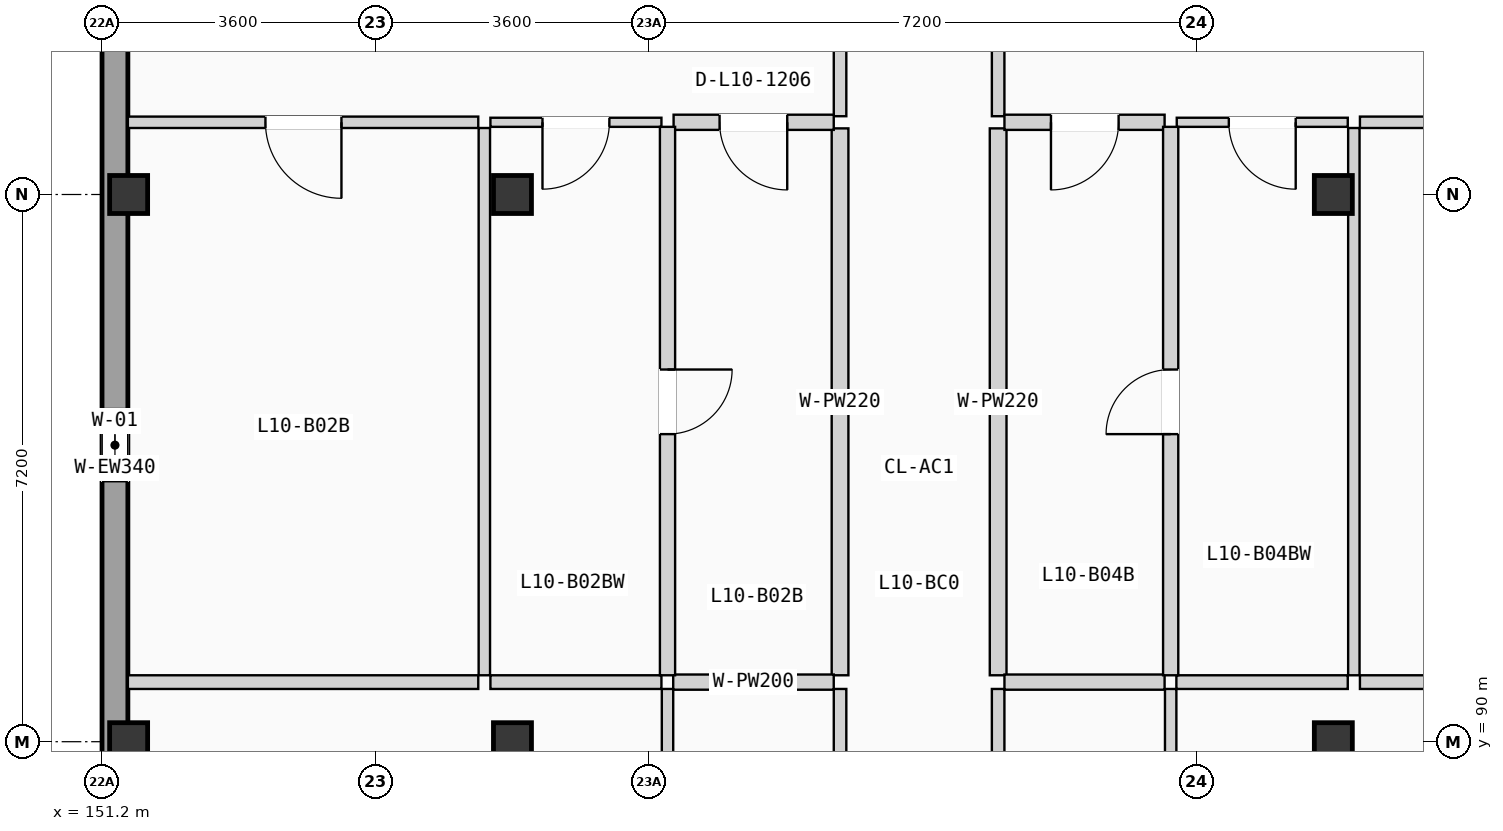
"""IFC4 building model, lengths in metres.
Left out: names, types, materials, properties, quantities, classifications, styles, units other than length and angle.
Written with IfcOpenShell. Run it as: python <this file> out.ifc"""

import sys

from ifc_helpers import new_model, si_unit, direction, frame, frame_2d, origin, origin_2d, place, context, subcontext, project, spatial, rectangle, extrude, element, fill, save


model = new_model("IFC4")
c1 = context("Model", 3, precision=1e-05, world=origin(), true_north=direction((0.0, 1.0)))
c2 = subcontext(c1, "Body", "Model", "MODEL_VIEW")
j1 = project(units=[si_unit("LENGTHUNIT", "METRE"), si_unit("PLANEANGLEUNIT", "RADIAN")], contexts=[c1])
p1 = place(None, origin())
s1 = spatial("IfcSite", under=j1, at=p1, CompositionType="ELEMENT")
p2 = place(p1, origin())
s2 = spatial("IfcBuilding", under=s1, at=p2, CompositionType="ELEMENT")
p3 = place(p2, frame((0.0, 0.0, 34.125)))
s3 = spatial("IfcBuildingStorey", under=s2, at=p3, CompositionType="ELEMENT", Elevation=34.125)
for number, where, z_axis, x_axis in (
    (1, (151.55, 90.0, 0.0), (0.0, 0.0, 1.0), (1.0, 0.0, 0.0)),
    (2, (151.55, 97.2, 0.0), (0.0, 0.0, 1.0), (1.0, 0.0, 0.0)),
    (3, (156.6, 90.0, 0.0), (0.0, 0.0, 1.0), (1.0, 0.0, 0.0)),
    (4, (156.6, 97.2, 0.0), (0.0, 0.0, 1.0), (1.0, 0.0, 0.0)),
    (5, (167.4, 90.0, 0.0), (0.0, 0.0, 1.0), (1.0, 0.0, 0.0)),
    (6, (167.4, 97.2, 0.0), (0.0, 0.0, 1.0), (1.0, 0.0, 0.0)),
):
    element("IfcColumn", number, at=place(p3, frame(where, z_axis=z_axis, x_axis=x_axis)), inside=s3, PredefinedType="COLUMN", context=c2, shape_type="SweptSolid", body=[
        extrude(rectangle(XDim=0.5, YDim=0.5, at=origin_2d()), origin(), (0.0, 0.0, 1.0), 3.15),
    ])
p4 = place(p3, frame((151.37, 68.74, 0.0), z_axis=(0.0, 0.0, 1.0), x_axis=(0.0, 1.0, 0.0)))
e7 = element("IfcWall", 7, at=p4, inside=s3, PredefinedType="SOLIDWALL", context=c2, shape_type="SweptSolid", body=[
    extrude(rectangle(XDim=49.72, YDim=0.34, at=frame_2d((24.86, 0.0))), origin(), (0.0, 0.0, 1.0), 2.89),
])
p5 = place(p4, frame((14.9, 0.0, 0.9)))
e8 = element("IfcOpeningElement", 8, at=p5, cuts=e7, PredefinedType="OPENING", context=c2, shape_type="SweptSolid", body=[
    extrude(rectangle(XDim=1.85, YDim=1.2, at=frame_2d((0.925, 0.6))), frame((0.0, 0.18, 0.0), z_axis=(0.0, -1.0, 0.0), x_axis=(1.0, 0.0, 0.0)), (0.0, 0.0, 1.0), 0.36),
])
p6 = place(p4, frame((8.573, 0.0, 0.855)))
e9 = element("IfcOpeningElement", 9, at=p6, cuts=e7, PredefinedType="OPENING", context=c2, shape_type="SweptSolid", body=[
    extrude(rectangle(XDim=1.85, YDim=1.35, at=frame_2d((0.925, 0.675))), frame((0.0, 0.18, 0.0), z_axis=(0.0, -1.0, 0.0), x_axis=(1.0, 0.0, 0.0)), (0.0, 0.0, 1.0), 0.36),
])
p7 = place(p4, frame((18.31, 0.0, 0.705)))
e10 = element("IfcOpeningElement", 10, at=p7, cuts=e7, PredefinedType="OPENING", context=c2, shape_type="SweptSolid", body=[
    extrude(rectangle(XDim=1.85, YDim=1.5, at=frame_2d((0.925, 0.75))), frame((0.0, 0.18, 0.0), z_axis=(0.0, -1.0, 0.0), x_axis=(1.0, 0.0, 0.0)), (0.0, 0.0, 1.0), 0.36),
])
p8 = place(p4, frame((31.135, 0.0, 0.555)))
e11 = element("IfcOpeningElement", 11, at=p8, cuts=e7, PredefinedType="OPENING", context=c2, shape_type="SweptSolid", body=[
    extrude(rectangle(XDim=1.85, YDim=1.65, at=frame_2d((0.925, 0.825))), frame((0.0, 0.18, 0.0), z_axis=(0.0, -1.0, 0.0), x_axis=(1.0, 0.0, 0.0)), (0.0, 0.0, 1.0), 0.36),
])
p9 = place(p4, frame((24.687, 0.0, 0.85)))
e12 = element("IfcOpeningElement", 12, at=p9, cuts=e7, PredefinedType="OPENING", context=c2, shape_type="SweptSolid", body=[
    extrude(rectangle(XDim=0.95, YDim=1.2, at=frame_2d((0.475, 0.6))), frame((0.0, 0.18, 0.0), z_axis=(0.0, -1.0, 0.0), x_axis=(1.0, 0.0, 0.0)), (0.0, 0.0, 1.0), 0.36),
])
p10 = place(p4, frame((38.195, 0.0, 0.9)))
e13 = element("IfcOpeningElement", 13, at=p10, cuts=e7, PredefinedType="OPENING", context=c2, shape_type="SweptSolid", body=[
    extrude(rectangle(XDim=2.0, YDim=1.2, at=frame_2d((1.0, 0.6))), frame((0.0, 0.18, 0.0), z_axis=(0.0, -1.0, 0.0), x_axis=(1.0, 0.0, 0.0)), (0.0, 0.0, 1.0), 0.36),
])
p11 = place(p3, frame((160.91, 86.219, 0.0), z_axis=(0.0, 0.0, 1.0), x_axis=(0.0, 1.0, 0.0)))
e14 = element("IfcWall", 14, at=p11, inside=s3, PredefinedType="PARTITIONING", context=c2, shape_type="SweptSolid", body=[
    extrude(rectangle(XDim=4.475, YDim=0.165, at=frame_2d((2.238, 0.0))), origin(), (0.0, 0.0, 1.0), 2.87),
])
p12 = place(p3, frame((160.91, 98.23, 0.0), z_axis=(0.0, 0.0, 1.0), x_axis=(0.0, 1.0, 0.0)))
e15 = element("IfcWall", 15, at=p12, inside=s3, PredefinedType="PARTITIONING", context=c2, shape_type="SweptSolid", body=[
    extrude(rectangle(XDim=5.14, YDim=0.165, at=frame_2d((2.57, 0.0))), origin(), (0.0, 0.0, 1.0), 2.87),
])
p13 = place(p12, frame((2.065, 0.0, 0.0)))
e16 = element("IfcOpeningElement", 16, at=p13, cuts=e15, PredefinedType="OPENING", context=c2, shape_type="SweptSolid", body=[
    extrude(rectangle(XDim=1.01, YDim=2.11, at=frame_2d((0.505, 1.055))), frame((0.0, 0.093, 0.0), z_axis=(0.0, -1.0, 0.0), x_axis=(1.0, 0.0, 0.0)), (0.0, 0.0, 1.0), 0.185),
])
p14 = place(p3, frame((160.91, 90.874, 0.0), z_axis=(0.0, 0.0, 1.0), x_axis=(0.0, 1.0, 0.0)))
e17 = element("IfcWall", 17, at=p14, inside=s3, PredefinedType="PLUMBINGWALL", context=c2, shape_type="SweptSolid", body=[
    extrude(rectangle(XDim=7.196, YDim=0.22, at=frame_2d((3.598, 0.0))), origin(), (0.0, 0.0, 1.0), 2.87),
])
p15 = place(p3, frame((162.99, 86.219, 0.0), z_axis=(0.0, 0.0, 1.0), x_axis=(0.0, 1.0, 0.0)))
e18 = element("IfcWall", 18, at=p15, inside=s3, PredefinedType="PARTITIONING", context=c2, shape_type="SweptSolid", body=[
    extrude(rectangle(XDim=4.475, YDim=0.165, at=frame_2d((2.238, 0.0))), origin(), (0.0, 0.0, 1.0), 2.87),
])
p16 = place(p3, frame((162.99, 98.23, 0.0), z_axis=(0.0, 0.0, 1.0), x_axis=(0.0, 1.0, 0.0)))
e19 = element("IfcWall", 19, at=p16, inside=s3, PredefinedType="PARTITIONING", context=c2, shape_type="SweptSolid", body=[
    extrude(rectangle(XDim=5.14, YDim=0.165, at=frame_2d((2.57, 0.0))), origin(), (0.0, 0.0, 1.0), 2.87),
])
p17 = place(p16, frame((2.065, 0.0, 0.0)))
e20 = element("IfcOpeningElement", 20, at=p17, cuts=e19, PredefinedType="OPENING", context=c2, shape_type="SweptSolid", body=[
    extrude(rectangle(XDim=1.01, YDim=2.11, at=frame_2d((0.505, 1.055))), frame((0.0, 0.093, 0.0), z_axis=(0.0, -1.0, 0.0), x_axis=(1.0, 0.0, 0.0)), (0.0, 0.0, 1.0), 0.185),
])
p18 = place(p3, frame((162.99, 90.874, 0.0), z_axis=(0.0, 0.0, 1.0), x_axis=(0.0, 1.0, 0.0)))
e21 = element("IfcWall", 21, at=p18, inside=s3, PredefinedType="PLUMBINGWALL", context=c2, shape_type="SweptSolid", body=[
    extrude(rectangle(XDim=7.196, YDim=0.22, at=frame_2d((3.598, 0.0))), origin(), (0.0, 0.0, 1.0), 2.87),
])
p19 = place(p3, frame((158.64, 86.199, 0.0), z_axis=(0.0, 0.0, 1.0), x_axis=(0.0, 1.0, 0.0)))
e22 = element("IfcWall", 22, at=p19, inside=s3, PredefinedType="PARTITIONING", context=c2, shape_type="SweptSolid", body=[
    extrude(rectangle(XDim=4.495, YDim=0.15, at=frame_2d((2.248, 0.0))), origin(), (0.0, 0.0, 1.0), 2.87),
])
p20 = place(p3, frame((158.715, 90.784, 0.0), z_axis=(0.0, 0.0, 1.0), x_axis=(1.0, 0.0, 0.0)))
e23 = element("IfcWall", 23, at=p20, inside=s3, PredefinedType="PLUMBINGWALL", context=c2, shape_type="SweptSolid", body=[
    extrude(rectangle(XDim=2.112, YDim=0.2, at=frame_2d((1.056, 0.0))), origin(), (0.0, 0.0, 1.0), 2.87),
])
p21 = place(p3, frame((151.54, 90.784, 0.0), z_axis=(0.0, 0.0, 1.0), x_axis=(1.0, 0.0, 0.0)))
e24 = element("IfcWall", 24, at=p21, inside=s3, PredefinedType="PARTITIONING", context=c2, shape_type="SweptSolid", body=[
    extrude(rectangle(XDim=4.61, YDim=0.18, at=frame_2d((2.305, 0.0))), origin(), (0.0, 0.0, 1.0), 2.87),
])
p22 = place(p3, frame((156.31, 90.784, 0.0), z_axis=(0.0, 0.0, 1.0), x_axis=(1.0, 0.0, 0.0)))
e25 = element("IfcWall", 25, at=p22, inside=s3, PredefinedType="PARTITIONING", context=c2, shape_type="SweptSolid", body=[
    extrude(rectangle(XDim=2.25, YDim=0.18, at=frame_2d((1.125, 0.0))), origin(), (0.0, 0.0, 1.0), 2.87),
])
p23 = place(p3, frame((158.72, 98.15, 0.0), z_axis=(0.0, 0.0, 1.0), x_axis=(1.0, 0.0, 0.0)))
e26 = element("IfcWall", 26, at=p23, inside=s3, PredefinedType="PLUMBINGWALL", context=c2, shape_type="SweptSolid", body=[
    extrude(rectangle(XDim=2.107, YDim=0.2, at=frame_2d((1.053, 0.0))), origin(), (0.0, 0.0, 1.0), 2.87),
])
p24 = place(p23, frame((0.605, 0.0, 0.0)))
e27 = element("IfcOpeningElement", 27, at=p24, cuts=e26, PredefinedType="OPENING", context=c2, shape_type="SweptSolid", body=[
    extrude(rectangle(XDim=0.89, YDim=2.03, at=frame_2d((0.445, 1.015))), frame((0.0, 0.11, 0.0), z_axis=(0.0, -1.0, 0.0), x_axis=(1.0, 0.0, 0.0)), (0.0, 0.0, 1.0), 0.22),
])
p25 = place(p3, frame((151.54, 98.15, 0.0), z_axis=(0.0, 0.0, 1.0), x_axis=(1.0, 0.0, 0.0)))
e28 = element("IfcWall", 28, at=p25, inside=s3, PredefinedType="PARTITIONING", context=c2, shape_type="SweptSolid", body=[
    extrude(rectangle(XDim=4.61, YDim=0.15, at=frame_2d((2.305, 0.0))), origin(), (0.0, 0.0, 1.0), 2.87),
])
p26 = place(p25, frame((1.81, 0.0, 0.0)))
e29 = element("IfcOpeningElement", 29, at=p26, cuts=e28, PredefinedType="OPENING", context=c2, shape_type="SweptSolid", body=[
    extrude(rectangle(XDim=1.0, YDim=2.06, at=frame_2d((0.5, 1.03))), frame((0.0, 0.085, 0.0), z_axis=(0.0, -1.0, 0.0), x_axis=(1.0, 0.0, 0.0)), (0.0, 0.0, 1.0), 0.17),
])
p27 = place(p3, frame((156.31, 98.15, 0.0), z_axis=(0.0, 0.0, 1.0), x_axis=(1.0, 0.0, 0.0)))
e30 = element("IfcWall", 30, at=p27, inside=s3, PredefinedType="PARTITIONING", context=c2, shape_type="SweptSolid", body=[
    extrude(rectangle(XDim=2.25, YDim=0.12, at=frame_2d((1.125, 0.0))), origin(), (0.0, 0.0, 1.0), 2.87),
])
p28 = place(p27, frame((0.685, 0.0, 0.0)))
e31 = element("IfcOpeningElement", 31, at=p28, cuts=e30, PredefinedType="OPENING", context=c2, shape_type="SweptSolid", body=[
    extrude(rectangle(XDim=0.88, YDim=2.02, at=frame_2d((0.44, 1.01))), frame((0.0, 0.07, 0.0), z_axis=(0.0, -1.0, 0.0), x_axis=(1.0, 0.0, 0.0)), (0.0, 0.0, 1.0), 0.14),
])
p29 = place(p3, frame((158.64, 90.874, 0.0), z_axis=(0.0, 0.0, 1.0), x_axis=(0.0, 1.0, 0.0)))
e32 = element("IfcWall", 32, at=p29, inside=s3, PredefinedType="PLUMBINGWALL", context=c2, shape_type="SweptSolid", body=[
    extrude(rectangle(XDim=7.216, YDim=0.2, at=frame_2d((3.608, 0.0))), origin(), (0.0, 0.0, 1.0), 2.87),
])
p30 = place(p29, frame((3.173, 0.0, 0.0)))
e33 = element("IfcOpeningElement", 33, at=p30, cuts=e32, PredefinedType="OPENING", context=c2, shape_type="SweptSolid", body=[
    extrude(rectangle(XDim=0.85, YDim=2.01, at=frame_2d((0.425, 1.005))), frame((0.0, 0.11, 0.0), z_axis=(0.0, -1.0, 0.0), x_axis=(1.0, 0.0, 0.0)), (0.0, 0.0, 1.0), 0.22),
])
p31 = place(p3, frame((156.23, 90.874, 0.0), z_axis=(0.0, 0.0, 1.0), x_axis=(0.0, 1.0, 0.0)))
e34 = element("IfcWall", 34, at=p31, inside=s3, PredefinedType="PARTITIONING", context=c2, shape_type="SweptSolid", body=[
    extrude(rectangle(XDim=7.201, YDim=0.15, at=frame_2d((3.601, 0.0))), origin(), (0.0, 0.0, 1.0), 2.87),
])
p32 = place(p3, frame((165.26, 86.199, 0.0), z_axis=(0.0, 0.0, 1.0), x_axis=(0.0, 1.0, 0.0)))
e35 = element("IfcWall", 35, at=p32, inside=s3, PredefinedType="PARTITIONING", context=c2, shape_type="SweptSolid", body=[
    extrude(rectangle(XDim=4.495, YDim=0.15, at=frame_2d((2.248, 0.0))), origin(), (0.0, 0.0, 1.0), 2.87),
])
p33 = place(p3, frame((163.073, 90.784, 0.0), z_axis=(0.0, 0.0, 1.0), x_axis=(1.0, 0.0, 0.0)))
e36 = element("IfcWall", 36, at=p33, inside=s3, PredefinedType="PLUMBINGWALL", context=c2, shape_type="SweptSolid", body=[
    extrude(rectangle(XDim=2.107, YDim=0.2, at=frame_2d((1.053, 0.0))), origin(), (0.0, 0.0, 1.0), 2.87),
])
p34 = place(p3, frame((167.75, 90.784, 0.0), z_axis=(0.0, 0.0, 1.0), x_axis=(1.0, 0.0, 0.0)))
e37 = element("IfcWall", 37, at=p34, inside=s3, PredefinedType="PARTITIONING", context=c2, shape_type="SweptSolid", body=[
    extrude(rectangle(XDim=4.71, YDim=0.18, at=frame_2d((2.355, 0.0))), origin(), (0.0, 0.0, 1.0), 2.87),
])
p35 = place(p3, frame((165.335, 90.784, 0.0), z_axis=(0.0, 0.0, 1.0), x_axis=(1.0, 0.0, 0.0)))
e38 = element("IfcWall", 38, at=p35, inside=s3, PredefinedType="PARTITIONING", context=c2, shape_type="SweptSolid", body=[
    extrude(rectangle(XDim=2.255, YDim=0.18, at=frame_2d((1.127, 0.0))), origin(), (0.0, 0.0, 1.0), 2.87),
])
p36 = place(p3, frame((163.073, 98.15, 0.0), z_axis=(0.0, 0.0, 1.0), x_axis=(1.0, 0.0, 0.0)))
e39 = element("IfcWall", 39, at=p36, inside=s3, PredefinedType="PLUMBINGWALL", context=c2, shape_type="SweptSolid", body=[
    extrude(rectangle(XDim=2.107, YDim=0.2, at=frame_2d((1.053, 0.0))), origin(), (0.0, 0.0, 1.0), 2.87),
])
p37 = place(p36, frame((0.612, 0.0, 0.0)))
e40 = element("IfcOpeningElement", 40, at=p37, cuts=e39, PredefinedType="OPENING", context=c2, shape_type="SweptSolid", body=[
    extrude(rectangle(XDim=0.89, YDim=2.03, at=frame_2d((0.445, 1.015))), frame((0.0, 0.11, 0.0), z_axis=(0.0, -1.0, 0.0), x_axis=(1.0, 0.0, 0.0)), (0.0, 0.0, 1.0), 0.22),
])
p38 = place(p3, frame((167.75, 98.15, 0.0), z_axis=(0.0, 0.0, 1.0), x_axis=(1.0, 0.0, 0.0)))
e41 = element("IfcWall", 41, at=p38, inside=s3, PredefinedType="PARTITIONING", context=c2, shape_type="SweptSolid", body=[
    extrude(rectangle(XDim=4.71, YDim=0.15, at=frame_2d((2.355, 0.0))), origin(), (0.0, 0.0, 1.0), 2.87),
])
p39 = place(p38, frame((1.88, 0.0, 0.0)))
e42 = element("IfcOpeningElement", 42, at=p39, cuts=e41, PredefinedType="OPENING", context=c2, shape_type="SweptSolid", body=[
    extrude(rectangle(XDim=0.94, YDim=2.06, at=frame_2d((0.47, 1.03))), frame((0.0, 0.085, 0.0), z_axis=(0.0, -1.0, 0.0), x_axis=(1.0, 0.0, 0.0)), (0.0, 0.0, 1.0), 0.17),
])
p40 = place(p3, frame((165.34, 98.15, 0.0), z_axis=(0.0, 0.0, 1.0), x_axis=(1.0, 0.0, 0.0)))
e43 = element("IfcWall", 43, at=p40, inside=s3, PredefinedType="PARTITIONING", context=c2, shape_type="SweptSolid", body=[
    extrude(rectangle(XDim=2.25, YDim=0.12, at=frame_2d((1.125, 0.0))), origin(), (0.0, 0.0, 1.0), 2.87),
])
p41 = place(p40, frame((0.685, 0.0, 0.0)))
e44 = element("IfcOpeningElement", 44, at=p41, cuts=e43, PredefinedType="OPENING", context=c2, shape_type="SweptSolid", body=[
    extrude(rectangle(XDim=0.88, YDim=2.02, at=frame_2d((0.44, 1.01))), frame((0.0, 0.07, 0.0), z_axis=(0.0, -1.0, 0.0), x_axis=(1.0, 0.0, 0.0)), (0.0, 0.0, 1.0), 0.14),
])
p42 = place(p3, frame((165.26, 90.874, 0.0), z_axis=(0.0, 0.0, 1.0), x_axis=(0.0, 1.0, 0.0)))
e45 = element("IfcWall", 45, at=p42, inside=s3, PredefinedType="PLUMBINGWALL", context=c2, shape_type="SweptSolid", body=[
    extrude(rectangle(XDim=7.216, YDim=0.2, at=frame_2d((3.608, 0.0))), origin(), (0.0, 0.0, 1.0), 2.87),
])
p43 = place(p42, frame((3.173, 0.0, 0.0)))
e46 = element("IfcOpeningElement", 46, at=p43, cuts=e45, PredefinedType="OPENING", context=c2, shape_type="SweptSolid", body=[
    extrude(rectangle(XDim=0.85, YDim=2.01, at=frame_2d((0.425, 1.005))), frame((0.0, 0.11, 0.0), z_axis=(0.0, -1.0, 0.0), x_axis=(1.0, 0.0, 0.0)), (0.0, 0.0, 1.0), 0.22),
])
p44 = place(p3, frame((167.67, 90.874, 0.0), z_axis=(0.0, 0.0, 1.0), x_axis=(0.0, 1.0, 0.0)))
e47 = element("IfcWall", 47, at=p44, inside=s3, PredefinedType="PARTITIONING", context=c2, shape_type="SweptSolid", body=[
    extrude(rectangle(XDim=7.201, YDim=0.15, at=frame_2d((3.601, 0.0))), origin(), (0.0, 0.0, 1.0), 2.87),
])
p45 = place(p9, origin())
e48 = element("IfcWindow", 48, at=p45, inside=s3, PartitioningType="SINGLE_PANEL", PredefinedType="WINDOW", context=c2, shape_type="SweptSolid", body=[
    extrude(rectangle(XDim=0.95, YDim=1.2, at=frame_2d((0.475, 0.6))), frame((0.0, 0.03, 0.0), z_axis=(0.0, -1.0, 0.0), x_axis=(1.0, 0.0, 0.0)), (0.0, 0.0, 1.0), 0.06),
])
fill(e12, e48)
p46 = place(p24, frame((0.89, 0.0, 0.0), z_axis=(0.0, 0.0, 1.0), x_axis=(-1.0, 0.0, 0.0)))
e49 = element("IfcDoor", 49, at=p46, inside=s3, OperationType="SINGLE_SWING_RIGHT", PredefinedType="DOOR", context=c2, shape_type="SweptSolid", body=[
    extrude(rectangle(XDim=0.89, YDim=2.03, at=frame_2d((0.445, 1.015))), frame((0.0, 0.025, 0.0), z_axis=(0.0, -1.0, 0.0), x_axis=(1.0, 0.0, 0.0)), (0.0, 0.0, 1.0), 0.05),
])
fill(e27, e49)
p47 = place(p26, frame((1.0, 0.0, 0.0), z_axis=(0.0, 0.0, 1.0), x_axis=(-1.0, 0.0, 0.0)))
e50 = element("IfcDoor", 50, at=p47, inside=s3, OperationType="SINGLE_SWING_RIGHT", PredefinedType="DOOR", context=c2, shape_type="SweptSolid", body=[
    extrude(rectangle(XDim=1.0, YDim=2.06, at=frame_2d((0.5, 1.03))), frame((0.0, 0.025, 0.0), z_axis=(0.0, -1.0, 0.0), x_axis=(1.0, 0.0, 0.0)), (0.0, 0.0, 1.0), 0.05),
])
fill(e29, e50)
p48 = place(p28, frame((0.88, 0.0, 0.0), z_axis=(0.0, 0.0, 1.0), x_axis=(-1.0, 0.0, 0.0)))
e51 = element("IfcDoor", 51, at=p48, inside=s3, OperationType="SINGLE_SWING_LEFT", PredefinedType="DOOR", context=c2, shape_type="SweptSolid", body=[
    extrude(rectangle(XDim=0.88, YDim=2.02, at=frame_2d((0.44, 1.01))), frame((0.0, 0.025, 0.0), z_axis=(0.0, -1.0, 0.0), x_axis=(1.0, 0.0, 0.0)), (0.0, 0.0, 1.0), 0.05),
])
fill(e31, e51)
p49 = place(p30, frame((0.85, 0.0, 0.0), z_axis=(0.0, 0.0, 1.0), x_axis=(-1.0, 0.0, 0.0)))
e52 = element("IfcDoor", 52, at=p49, inside=s3, OperationType="SINGLE_SWING_RIGHT", PredefinedType="DOOR", context=c2, shape_type="SweptSolid", body=[
    extrude(rectangle(XDim=0.85, YDim=2.01, at=frame_2d((0.425, 1.005))), frame((0.0, 0.025, 0.0), z_axis=(0.0, -1.0, 0.0), x_axis=(1.0, 0.0, 0.0)), (0.0, 0.0, 1.0), 0.05),
])
fill(e33, e52)
p50 = place(p37, frame((0.89, 0.0, 0.0), z_axis=(0.0, 0.0, 1.0), x_axis=(-1.0, 0.0, 0.0)))
e53 = element("IfcDoor", 53, at=p50, inside=s3, OperationType="SINGLE_SWING_LEFT", PredefinedType="DOOR", context=c2, shape_type="SweptSolid", body=[
    extrude(rectangle(XDim=0.89, YDim=2.03, at=frame_2d((0.445, 1.015))), frame((0.0, 0.025, 0.0), z_axis=(0.0, -1.0, 0.0), x_axis=(1.0, 0.0, 0.0)), (0.0, 0.0, 1.0), 0.05),
])
fill(e40, e53)
p51 = place(p41, frame((0.88, 0.0, 0.0), z_axis=(0.0, 0.0, 1.0), x_axis=(-1.0, 0.0, 0.0)))
e54 = element("IfcDoor", 54, at=p51, inside=s3, OperationType="SINGLE_SWING_RIGHT", PredefinedType="DOOR", context=c2, shape_type="SweptSolid", body=[
    extrude(rectangle(XDim=0.88, YDim=2.02, at=frame_2d((0.44, 1.01))), frame((0.0, 0.025, 0.0), z_axis=(0.0, -1.0, 0.0), x_axis=(1.0, 0.0, 0.0)), (0.0, 0.0, 1.0), 0.05),
])
fill(e44, e54)
p52 = place(p43, origin())
e55 = element("IfcDoor", 55, at=p52, inside=s3, OperationType="SINGLE_SWING_LEFT", PredefinedType="DOOR", context=c2, shape_type="SweptSolid", body=[
    extrude(rectangle(XDim=0.85, YDim=2.01, at=frame_2d((0.425, 1.005))), frame((0.0, 0.025, 0.0), z_axis=(0.0, -1.0, 0.0), x_axis=(1.0, 0.0, 0.0)), (0.0, 0.0, 1.0), 0.05),
])
fill(e46, e55)
save(model, sys.argv[1])
